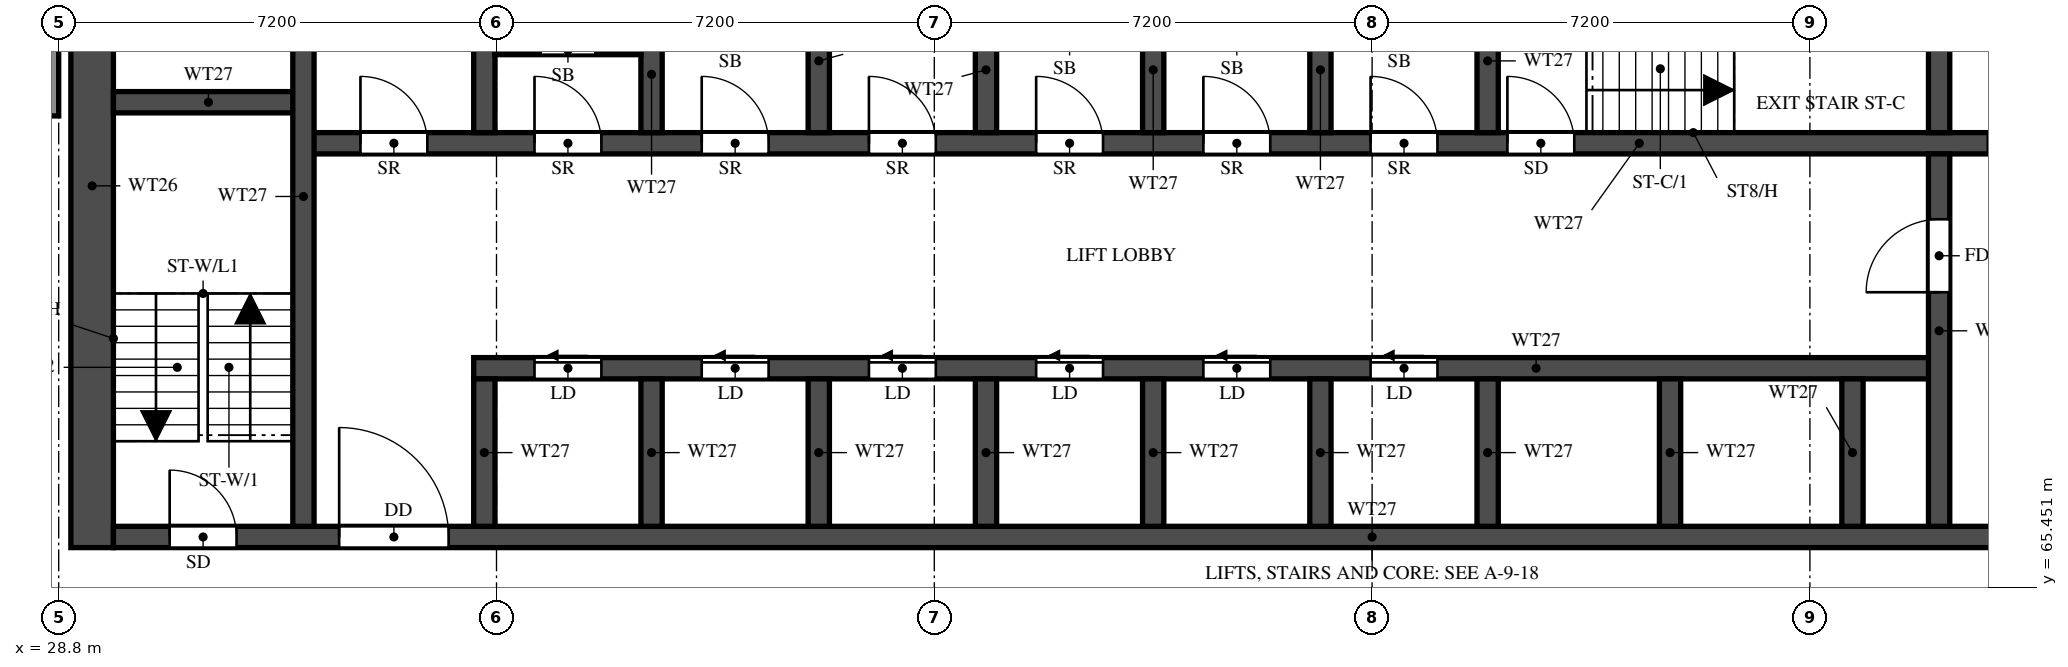
"""IFC4 building model, lengths in metres.
Left out: names, types, materials, properties, quantities, classifications, styles, units other than length and angle.
Written with IfcOpenShell. Run it as: python <this file> out.ifc"""

import sys

from ifc_helpers import new_model, si_unit, direction, frame, frame_2d, origin, place, context, subcontext, project, spatial, rectangle, extrude, element, fill, save


model = new_model("IFC4")
c1 = context("Model", 3, precision=1e-05, world=origin(), true_north=direction((0.0, 1.0)))
c2 = subcontext(c1, "Body", "Model", "MODEL_VIEW")
j1 = project(units=[si_unit("LENGTHUNIT", "METRE"), si_unit("PLANEANGLEUNIT", "RADIAN")], contexts=[c1])
p1 = place(None, origin())
s1 = spatial("IfcSite", under=j1, at=p1, CompositionType="ELEMENT")
p2 = place(p1, origin())
s2 = spatial("IfcBuilding", under=s1, at=p2, CompositionType="ELEMENT")
p3 = place(p2, frame((0.0, 0.0, 127.0)))
s3 = spatial("IfcBuildingStorey", under=s2, at=p3, CompositionType="ELEMENT", Elevation=127.0)
p4 = place(p3, frame((29.35, 66.1, 0.0), z_axis=(0.0, 0.0, 1.0), x_axis=(0.0, 1.0, 0.0)))
e1 = element("IfcWall", 1, at=p4, inside=s3, PredefinedType="SHEAR", context=c2, shape_type="SweptSolid", body=[
    extrude(rectangle(XDim=11.9, YDim=0.7, at=frame_2d((5.95, 0.0))), origin(), (0.0, 0.0, 1.0), 3.2),
])
p5 = place(p3, frame((29.7, 66.275, 0.0), z_axis=(0.0, 0.0, 1.0), x_axis=(1.0, 0.0, 0.0)))
e2 = element("IfcWall", 2, at=p5, inside=s3, PredefinedType="SHEAR", context=c2, shape_type="SweptSolid", body=[
    extrude(rectangle(XDim=41.4, YDim=0.35, at=frame_2d((20.7, 0.0))), origin(), (0.0, 0.0, 1.0), 3.2),
])
p6 = place(p5, frame((0.925, 0.0, 0.0)))
e3 = element("IfcOpeningElement", 3, at=p6, cuts=e2, PredefinedType="OPENING", context=c2, shape_type="SweptSolid", body=[
    extrude(rectangle(XDim=1.1, YDim=2.1, at=frame_2d((0.55, 1.05))), frame((0.0, 0.185, 0.0), z_axis=(0.0, -1.0, 0.0), x_axis=(1.0, 0.0, 0.0)), (0.0, 0.0, 1.0), 0.37),
])
p7 = place(p5, frame((3.712, 0.0, 0.0)))
e4 = element("IfcOpeningElement", 4, at=p7, cuts=e2, PredefinedType="OPENING", context=c2, shape_type="SweptSolid", body=[
    extrude(rectangle(XDim=1.8, YDim=2.1, at=frame_2d((0.9, 1.05))), frame((0.0, 0.185, 0.0), z_axis=(0.0, -1.0, 0.0), x_axis=(1.0, 0.0, 0.0)), (0.0, 0.0, 1.0), 0.37),
])
p8 = place(p3, frame((35.625, 69.05, 0.0), z_axis=(0.0, 0.0, 1.0), x_axis=(1.0, 0.0, 0.0)))
e5 = element("IfcWall", 5, at=p8, inside=s3, PredefinedType="SHEAR", context=c2, shape_type="SweptSolid", body=[
    extrude(rectangle(XDim=24.1, YDim=0.35, at=frame_2d((12.05, 0.0))), origin(), (0.0, 0.0, 1.0), 3.2),
])
p9 = place(p8, frame((1.0, 0.0, 0.0)))
e6 = element("IfcOpeningElement", 6, at=p9, cuts=e5, PredefinedType="OPENING", context=c2, shape_type="SweptSolid", body=[
    extrude(rectangle(XDim=1.1, YDim=2.1, at=frame_2d((0.55, 1.05))), frame((0.0, 0.185, 0.0), z_axis=(0.0, -1.0, 0.0), x_axis=(1.0, 0.0, 0.0)), (0.0, 0.0, 1.0), 0.37),
])
p10 = place(p8, frame((3.75, 0.0, 0.0)))
e7 = element("IfcOpeningElement", 7, at=p10, cuts=e5, PredefinedType="OPENING", context=c2, shape_type="SweptSolid", body=[
    extrude(rectangle(XDim=1.1, YDim=2.1, at=frame_2d((0.55, 1.05))), frame((0.0, 0.185, 0.0), z_axis=(0.0, -1.0, 0.0), x_axis=(1.0, 0.0, 0.0)), (0.0, 0.0, 1.0), 0.37),
])
p11 = place(p8, frame((6.5, 0.0, 0.0)))
e8 = element("IfcOpeningElement", 8, at=p11, cuts=e5, PredefinedType="OPENING", context=c2, shape_type="SweptSolid", body=[
    extrude(rectangle(XDim=1.1, YDim=2.1, at=frame_2d((0.55, 1.05))), frame((0.0, 0.185, 0.0), z_axis=(0.0, -1.0, 0.0), x_axis=(1.0, 0.0, 0.0)), (0.0, 0.0, 1.0), 0.37),
])
p12 = place(p8, frame((9.25, 0.0, 0.0)))
e9 = element("IfcOpeningElement", 9, at=p12, cuts=e5, PredefinedType="OPENING", context=c2, shape_type="SweptSolid", body=[
    extrude(rectangle(XDim=1.1, YDim=2.1, at=frame_2d((0.55, 1.05))), frame((0.0, 0.185, 0.0), z_axis=(0.0, -1.0, 0.0), x_axis=(1.0, 0.0, 0.0)), (0.0, 0.0, 1.0), 0.37),
])
p13 = place(p8, frame((12.0, 0.0, 0.0)))
e10 = element("IfcOpeningElement", 10, at=p13, cuts=e5, PredefinedType="OPENING", context=c2, shape_type="SweptSolid", body=[
    extrude(rectangle(XDim=1.1, YDim=2.1, at=frame_2d((0.55, 1.05))), frame((0.0, 0.185, 0.0), z_axis=(0.0, -1.0, 0.0), x_axis=(1.0, 0.0, 0.0)), (0.0, 0.0, 1.0), 0.37),
])
p14 = place(p8, frame((14.75, 0.0, 0.0)))
e11 = element("IfcOpeningElement", 11, at=p14, cuts=e5, PredefinedType="OPENING", context=c2, shape_type="SweptSolid", body=[
    extrude(rectangle(XDim=1.1, YDim=2.1, at=frame_2d((0.55, 1.05))), frame((0.0, 0.185, 0.0), z_axis=(0.0, -1.0, 0.0), x_axis=(1.0, 0.0, 0.0)), (0.0, 0.0, 1.0), 0.37),
])
p15 = place(p3, frame((32.825, 72.75, 0.0), z_axis=(0.0, 0.0, 1.0), x_axis=(1.0, 0.0, 0.0)))
e12 = element("IfcWall", 12, at=p15, inside=s3, PredefinedType="SHEAR", context=c2, shape_type="SweptSolid", body=[
    extrude(rectangle(XDim=35.15, YDim=0.35, at=frame_2d((17.575, 0.0))), origin(), (0.0, 0.0, 1.0), 3.2),
])
p16 = place(p15, frame((19.8, 0.0, 0.0)))
e13 = element("IfcOpeningElement", 13, at=p16, cuts=e12, PredefinedType="OPENING", context=c2, shape_type="SweptSolid", body=[
    extrude(rectangle(XDim=1.1, YDim=2.1, at=frame_2d((0.55, 1.05))), frame((0.0, 0.185, 0.0), z_axis=(0.0, -1.0, 0.0), x_axis=(1.0, 0.0, 0.0)), (0.0, 0.0, 1.0), 0.37),
])
p17 = place(p15, frame((27.7, 0.0, 0.0)))
e14 = element("IfcOpeningElement", 14, at=p17, cuts=e12, PredefinedType="OPENING", context=c2, shape_type="SweptSolid", body=[
    extrude(rectangle(XDim=1.1, YDim=2.1, at=frame_2d((0.55, 1.05))), frame((0.0, 0.185, 0.0), z_axis=(0.0, -1.0, 0.0), x_axis=(1.0, 0.0, 0.0)), (0.0, 0.0, 1.0), 0.37),
])
p18 = place(p15, frame((30.3, 0.0, 0.0)))
e15 = element("IfcOpeningElement", 15, at=p18, cuts=e12, PredefinedType="OPENING", context=c2, shape_type="SweptSolid", body=[
    extrude(rectangle(XDim=1.1, YDim=2.1, at=frame_2d((0.55, 1.05))), frame((0.0, 0.185, 0.0), z_axis=(0.0, -1.0, 0.0), x_axis=(1.0, 0.0, 0.0)), (0.0, 0.0, 1.0), 0.37),
])
p19 = place(p15, frame((3.8, 0.0, 0.0)))
e16 = element("IfcOpeningElement", 16, at=p19, cuts=e12, PredefinedType="OPENING", context=c2, shape_type="SweptSolid", body=[
    extrude(rectangle(XDim=1.1, YDim=2.1, at=frame_2d((0.55, 1.05))), frame((0.0, 0.185, 0.0), z_axis=(0.0, -1.0, 0.0), x_axis=(1.0, 0.0, 0.0)), (0.0, 0.0, 1.0), 0.37),
])
p20 = place(p15, frame((6.55, 0.0, 0.0)))
e17 = element("IfcOpeningElement", 17, at=p20, cuts=e12, PredefinedType="OPENING", context=c2, shape_type="SweptSolid", body=[
    extrude(rectangle(XDim=1.1, YDim=2.1, at=frame_2d((0.55, 1.05))), frame((0.0, 0.185, 0.0), z_axis=(0.0, -1.0, 0.0), x_axis=(1.0, 0.0, 0.0)), (0.0, 0.0, 1.0), 0.37),
])
p21 = place(p15, frame((9.3, 0.0, 0.0)))
e18 = element("IfcOpeningElement", 18, at=p21, cuts=e12, PredefinedType="OPENING", context=c2, shape_type="SweptSolid", body=[
    extrude(rectangle(XDim=1.1, YDim=2.1, at=frame_2d((0.55, 1.05))), frame((0.0, 0.185, 0.0), z_axis=(0.0, -1.0, 0.0), x_axis=(1.0, 0.0, 0.0)), (0.0, 0.0, 1.0), 0.37),
])
p22 = place(p15, frame((12.05, 0.0, 0.0)))
e19 = element("IfcOpeningElement", 19, at=p22, cuts=e12, PredefinedType="OPENING", context=c2, shape_type="SweptSolid", body=[
    extrude(rectangle(XDim=1.1, YDim=2.1, at=frame_2d((0.55, 1.05))), frame((0.0, 0.185, 0.0), z_axis=(0.0, -1.0, 0.0), x_axis=(1.0, 0.0, 0.0)), (0.0, 0.0, 1.0), 0.37),
])
p23 = place(p15, frame((14.8, 0.0, 0.0)))
e20 = element("IfcOpeningElement", 20, at=p23, cuts=e12, PredefinedType="OPENING", context=c2, shape_type="SweptSolid", body=[
    extrude(rectangle(XDim=1.1, YDim=2.1, at=frame_2d((0.55, 1.05))), frame((0.0, 0.185, 0.0), z_axis=(0.0, -1.0, 0.0), x_axis=(1.0, 0.0, 0.0)), (0.0, 0.0, 1.0), 0.37),
])
p24 = place(p15, frame((17.55, 0.0, 0.0)))
e21 = element("IfcOpeningElement", 21, at=p24, cuts=e12, PredefinedType="OPENING", context=c2, shape_type="SweptSolid", body=[
    extrude(rectangle(XDim=1.1, YDim=2.1, at=frame_2d((0.55, 1.05))), frame((0.0, 0.185, 0.0), z_axis=(0.0, -1.0, 0.0), x_axis=(1.0, 0.0, 0.0)), (0.0, 0.0, 1.0), 0.37),
])
p25 = place(p15, frame((0.938, 0.0, 0.0)))
e22 = element("IfcOpeningElement", 22, at=p25, cuts=e12, PredefinedType="OPENING", context=c2, shape_type="SweptSolid", body=[
    extrude(rectangle(XDim=1.1, YDim=2.1, at=frame_2d((0.55, 1.05))), frame((0.0, 0.185, 0.0), z_axis=(0.0, -1.0, 0.0), x_axis=(1.0, 0.0, 0.0)), (0.0, 0.0, 1.0), 0.37),
])
p26 = place(p3, frame((29.7, 73.425, 0.0), z_axis=(0.0, 0.0, 1.0), x_axis=(1.0, 0.0, 0.0)))
e23 = element("IfcWall", 23, at=p26, inside=s3, PredefinedType="SHEAR", context=c2, shape_type="SweptSolid", body=[
    extrude(rectangle(XDim=3.125, YDim=0.35, at=frame_2d((1.562, 0.0))), origin(), (0.0, 0.0, 1.0), 3.2),
])
p27 = place(p3, frame((32.825, 66.45, 0.0), z_axis=(0.0, 0.0, 1.0), x_axis=(0.0, 1.0, 0.0)))
e24 = element("IfcWall", 24, at=p27, inside=s3, PredefinedType="SHEAR", context=c2, shape_type="SweptSolid", body=[
    extrude(rectangle(XDim=10.85, YDim=0.35, at=frame_2d((5.425, 0.0))), origin(), (0.0, 0.0, 1.0), 3.2),
])
p28 = place(p3, frame((59.725, 66.45, 0.0), z_axis=(0.0, 0.0, 1.0), x_axis=(0.0, 1.0, 0.0)))
e25 = element("IfcWall", 25, at=p28, inside=s3, PredefinedType="SHEAR", context=c2, shape_type="SweptSolid", body=[
    extrude(rectangle(XDim=6.125, YDim=0.35, at=frame_2d((3.062, 0.0))), origin(), (0.0, 0.0, 1.0), 3.2),
])
p29 = place(p28, frame((3.85, 0.0, 0.0)))
e26 = element("IfcOpeningElement", 26, at=p29, cuts=e25, PredefinedType="OPENING", context=c2, shape_type="SweptSolid", body=[
    extrude(rectangle(XDim=1.2, YDim=2.1, at=frame_2d((0.6, 1.05))), frame((0.0, 0.185, 0.0), z_axis=(0.0, -1.0, 0.0), x_axis=(1.0, 0.0, 0.0)), (0.0, 0.0, 1.0), 0.37),
])
p30 = place(p3, frame((59.725, 72.925, 0.0), z_axis=(0.0, 0.0, 1.0), x_axis=(0.0, 1.0, 0.0)))
e27 = element("IfcWall", 27, at=p30, inside=s3, PredefinedType="SHEAR", context=c2, shape_type="SweptSolid", body=[
    extrude(rectangle(XDim=2.95, YDim=0.35, at=frame_2d((1.475, 0.0))), origin(), (0.0, 0.0, 1.0), 3.2),
])
for number, where, z_axis, x_axis in (
    (28, (35.8, 66.45, 0.0), (0.0, 0.0, 1.0), (0.0, 1.0, 0.0)),
    (29, (38.55, 66.45, 0.0), (0.0, 0.0, 1.0), (0.0, 1.0, 0.0)),
    (30, (41.3, 66.45, 0.0), (0.0, 0.0, 1.0), (0.0, 1.0, 0.0)),
    (31, (44.05, 66.45, 0.0), (0.0, 0.0, 1.0), (0.0, 1.0, 0.0)),
    (32, (46.8, 66.45, 0.0), (0.0, 0.0, 1.0), (0.0, 1.0, 0.0)),
    (33, (49.55, 66.45, 0.0), (0.0, 0.0, 1.0), (0.0, 1.0, 0.0)),
    (34, (52.3, 66.45, 0.0), (0.0, 0.0, 1.0), (0.0, 1.0, 0.0)),
    (35, (55.3, 66.45, 0.0), (0.0, 0.0, 1.0), (0.0, 1.0, 0.0)),
    (36, (58.3, 66.45, 0.0), (0.0, 0.0, 1.0), (0.0, 1.0, 0.0)),
):
    element("IfcWall", number, at=place(p3, frame(where, z_axis=z_axis, x_axis=x_axis)), inside=s3, PredefinedType="SHEAR", context=c2, shape_type="SweptSolid", body=[
        extrude(rectangle(XDim=2.425, YDim=0.35, at=frame_2d((1.212, 0.0))), origin(), (0.0, 0.0, 1.0), 3.2),
    ])
for number, where, z_axis, x_axis in (
    (37, (35.8, 72.925, 0.0), (0.0, 0.0, 1.0), (0.0, 1.0, 0.0)),
    (38, (38.55, 72.925, 0.0), (0.0, 0.0, 1.0), (0.0, 1.0, 0.0)),
    (39, (41.3, 72.925, 0.0), (0.0, 0.0, 1.0), (0.0, 1.0, 0.0)),
    (40, (44.05, 72.925, 0.0), (0.0, 0.0, 1.0), (0.0, 1.0, 0.0)),
    (41, (46.8, 72.925, 0.0), (0.0, 0.0, 1.0), (0.0, 1.0, 0.0)),
    (42, (49.55, 72.925, 0.0), (0.0, 0.0, 1.0), (0.0, 1.0, 0.0)),
    (43, (52.3, 72.925, 0.0), (0.0, 0.0, 1.0), (0.0, 1.0, 0.0)),
):
    element("IfcWall", number, at=place(p3, frame(where, z_axis=z_axis, x_axis=x_axis)), inside=s3, PredefinedType="SHEAR", context=c2, shape_type="SweptSolid", body=[
        extrude(rectangle(XDim=2.95, YDim=0.35, at=frame_2d((1.475, 0.0))), origin(), (0.0, 0.0, 1.0), 3.2),
    ])
p31 = place(p3, frame((35.975, 74.282, 0.0), z_axis=(0.0, 0.0, 1.0), x_axis=(1.0, 0.0, 0.0)))
e44 = element("IfcWall", 44, at=p31, inside=s3, PredefinedType="PARTITIONING", context=c2, shape_type="SweptSolid", body=[
    extrude(rectangle(XDim=2.4, YDim=0.15, at=frame_2d((1.2, 0.0))), origin(), (0.0, 0.0, 1.0), 3.2),
])
p32 = place(p31, frame((0.75, 0.0, 0.0)))
e45 = element("IfcOpeningElement", 45, at=p32, cuts=e44, PredefinedType="OPENING", context=c2, shape_type="SweptSolid", body=[
    extrude(rectangle(XDim=0.9, YDim=2.1, at=frame_2d((0.45, 1.05))), frame((0.0, 0.085, 0.0), z_axis=(0.0, -1.0, 0.0), x_axis=(1.0, 0.0, 0.0)), (0.0, 0.0, 1.0), 0.17),
])
p33 = place(p3, frame((28.7, 73.2, 0.0), z_axis=(0.0, 0.0, 1.0), x_axis=(0.0, 1.0, 0.0)))
e46 = element("IfcWall", 46, at=p33, inside=s3, PredefinedType="SOLIDWALL", context=c2, shape_type="SweptSolid", body=[
    extrude(rectangle(XDim=4.8, YDim=0.2, at=frame_2d((2.4, 0.0))), origin(), (0.0, 0.0, 1.0), 3.2),
])
p34 = place(p6, origin())
e47 = element("IfcDoor", 47, at=p34, inside=s3, OperationType="SINGLE_SWING_LEFT", PredefinedType="DOOR", context=c2, shape_type="SweptSolid", body=[
    extrude(rectangle(XDim=1.1, YDim=2.1, at=frame_2d((0.55, 1.05))), frame((0.0, 0.025, 0.0), z_axis=(0.0, -1.0, 0.0), x_axis=(1.0, 0.0, 0.0)), (0.0, 0.0, 1.0), 0.05),
])
fill(e3, e47)
p35 = place(p16, origin())
e48 = element("IfcDoor", 48, at=p35, inside=s3, OperationType="SINGLE_SWING_LEFT", PredefinedType="DOOR", context=c2, shape_type="SweptSolid", body=[
    extrude(rectangle(XDim=1.1, YDim=2.1, at=frame_2d((0.55, 1.05))), frame((0.0, 0.025, 0.0), z_axis=(0.0, -1.0, 0.0), x_axis=(1.0, 0.0, 0.0)), (0.0, 0.0, 1.0), 0.05),
])
fill(e13, e48)
p36 = place(p7, origin())
e49 = element("IfcDoor", 49, at=p36, inside=s3, OperationType="DOUBLE_DOOR_SINGLE_SWING", PredefinedType="DOOR", context=c2, shape_type="SweptSolid", body=[
    extrude(rectangle(XDim=1.8, YDim=2.1, at=frame_2d((0.9, 1.05))), frame((0.0, 0.025, 0.0), z_axis=(0.0, -1.0, 0.0), x_axis=(1.0, 0.0, 0.0)), (0.0, 0.0, 1.0), 0.05),
])
fill(e4, e49)
p37 = place(p29, origin())
e50 = element("IfcDoor", 50, at=p37, inside=s3, OperationType="SINGLE_SWING_LEFT", PredefinedType="DOOR", context=c2, shape_type="SweptSolid", body=[
    extrude(rectangle(XDim=1.2, YDim=2.1, at=frame_2d((0.6, 1.05))), frame((0.0, 0.025, 0.0), z_axis=(0.0, -1.0, 0.0), x_axis=(1.0, 0.0, 0.0)), (0.0, 0.0, 1.0), 0.05),
])
fill(e26, e50)
p38 = place(p17, origin())
e51 = element("IfcDoor", 51, at=p38, inside=s3, OperationType="SLIDING_TO_LEFT", PredefinedType="DOOR", context=c2, shape_type="SweptSolid", body=[
    extrude(rectangle(XDim=1.1, YDim=2.1, at=frame_2d((0.55, 1.05))), frame((0.0, 0.025, 0.0), z_axis=(0.0, -1.0, 0.0), x_axis=(1.0, 0.0, 0.0)), (0.0, 0.0, 1.0), 0.05),
])
fill(e14, e51)
p39 = place(p9, origin())
e52 = element("IfcDoor", 52, at=p39, inside=s3, OperationType="SLIDING_TO_LEFT", PredefinedType="DOOR", context=c2, shape_type="SweptSolid", body=[
    extrude(rectangle(XDim=1.1, YDim=2.1, at=frame_2d((0.55, 1.05))), frame((0.0, 0.025, 0.0), z_axis=(0.0, -1.0, 0.0), x_axis=(1.0, 0.0, 0.0)), (0.0, 0.0, 1.0), 0.05),
])
fill(e6, e52)
p40 = place(p10, origin())
e53 = element("IfcDoor", 53, at=p40, inside=s3, OperationType="SLIDING_TO_LEFT", PredefinedType="DOOR", context=c2, shape_type="SweptSolid", body=[
    extrude(rectangle(XDim=1.1, YDim=2.1, at=frame_2d((0.55, 1.05))), frame((0.0, 0.025, 0.0), z_axis=(0.0, -1.0, 0.0), x_axis=(1.0, 0.0, 0.0)), (0.0, 0.0, 1.0), 0.05),
])
fill(e7, e53)
p41 = place(p11, origin())
e54 = element("IfcDoor", 54, at=p41, inside=s3, OperationType="SLIDING_TO_LEFT", PredefinedType="DOOR", context=c2, shape_type="SweptSolid", body=[
    extrude(rectangle(XDim=1.1, YDim=2.1, at=frame_2d((0.55, 1.05))), frame((0.0, 0.025, 0.0), z_axis=(0.0, -1.0, 0.0), x_axis=(1.0, 0.0, 0.0)), (0.0, 0.0, 1.0), 0.05),
])
fill(e8, e54)
p42 = place(p12, origin())
e55 = element("IfcDoor", 55, at=p42, inside=s3, OperationType="SLIDING_TO_LEFT", PredefinedType="DOOR", context=c2, shape_type="SweptSolid", body=[
    extrude(rectangle(XDim=1.1, YDim=2.1, at=frame_2d((0.55, 1.05))), frame((0.0, 0.025, 0.0), z_axis=(0.0, -1.0, 0.0), x_axis=(1.0, 0.0, 0.0)), (0.0, 0.0, 1.0), 0.05),
])
fill(e9, e55)
p43 = place(p13, origin())
e56 = element("IfcDoor", 56, at=p43, inside=s3, OperationType="SLIDING_TO_LEFT", PredefinedType="DOOR", context=c2, shape_type="SweptSolid", body=[
    extrude(rectangle(XDim=1.1, YDim=2.1, at=frame_2d((0.55, 1.05))), frame((0.0, 0.025, 0.0), z_axis=(0.0, -1.0, 0.0), x_axis=(1.0, 0.0, 0.0)), (0.0, 0.0, 1.0), 0.05),
])
fill(e10, e56)
p44 = place(p14, origin())
e57 = element("IfcDoor", 57, at=p44, inside=s3, OperationType="SLIDING_TO_LEFT", PredefinedType="DOOR", context=c2, shape_type="SweptSolid", body=[
    extrude(rectangle(XDim=1.1, YDim=2.1, at=frame_2d((0.55, 1.05))), frame((0.0, 0.025, 0.0), z_axis=(0.0, -1.0, 0.0), x_axis=(1.0, 0.0, 0.0)), (0.0, 0.0, 1.0), 0.05),
])
fill(e11, e57)
p45 = place(p19, origin())
e58 = element("IfcDoor", 58, at=p45, inside=s3, OperationType="SINGLE_SWING_LEFT", PredefinedType="DOOR", context=c2, shape_type="SweptSolid", body=[
    extrude(rectangle(XDim=1.1, YDim=2.1, at=frame_2d((0.55, 1.05))), frame((0.0, 0.025, 0.0), z_axis=(0.0, -1.0, 0.0), x_axis=(1.0, 0.0, 0.0)), (0.0, 0.0, 1.0), 0.05),
])
fill(e16, e58)
p46 = place(p20, origin())
e59 = element("IfcDoor", 59, at=p46, inside=s3, OperationType="SINGLE_SWING_RIGHT", PredefinedType="DOOR", context=c2, shape_type="SweptSolid", body=[
    extrude(rectangle(XDim=1.1, YDim=2.1, at=frame_2d((0.55, 1.05))), frame((0.0, 0.025, 0.0), z_axis=(0.0, -1.0, 0.0), x_axis=(1.0, 0.0, 0.0)), (0.0, 0.0, 1.0), 0.05),
])
fill(e17, e59)
p47 = place(p21, origin())
e60 = element("IfcDoor", 60, at=p47, inside=s3, OperationType="SINGLE_SWING_LEFT", PredefinedType="DOOR", context=c2, shape_type="SweptSolid", body=[
    extrude(rectangle(XDim=1.1, YDim=2.1, at=frame_2d((0.55, 1.05))), frame((0.0, 0.025, 0.0), z_axis=(0.0, -1.0, 0.0), x_axis=(1.0, 0.0, 0.0)), (0.0, 0.0, 1.0), 0.05),
])
fill(e18, e60)
p48 = place(p22, origin())
e61 = element("IfcDoor", 61, at=p48, inside=s3, OperationType="SINGLE_SWING_RIGHT", PredefinedType="DOOR", context=c2, shape_type="SweptSolid", body=[
    extrude(rectangle(XDim=1.1, YDim=2.1, at=frame_2d((0.55, 1.05))), frame((0.0, 0.025, 0.0), z_axis=(0.0, -1.0, 0.0), x_axis=(1.0, 0.0, 0.0)), (0.0, 0.0, 1.0), 0.05),
])
fill(e19, e61)
p49 = place(p23, origin())
e62 = element("IfcDoor", 62, at=p49, inside=s3, OperationType="SINGLE_SWING_LEFT", PredefinedType="DOOR", context=c2, shape_type="SweptSolid", body=[
    extrude(rectangle(XDim=1.1, YDim=2.1, at=frame_2d((0.55, 1.05))), frame((0.0, 0.025, 0.0), z_axis=(0.0, -1.0, 0.0), x_axis=(1.0, 0.0, 0.0)), (0.0, 0.0, 1.0), 0.05),
])
fill(e20, e62)
p50 = place(p24, origin())
e63 = element("IfcDoor", 63, at=p50, inside=s3, OperationType="SINGLE_SWING_RIGHT", PredefinedType="DOOR", context=c2, shape_type="SweptSolid", body=[
    extrude(rectangle(XDim=1.1, YDim=2.1, at=frame_2d((0.55, 1.05))), frame((0.0, 0.025, 0.0), z_axis=(0.0, -1.0, 0.0), x_axis=(1.0, 0.0, 0.0)), (0.0, 0.0, 1.0), 0.05),
])
fill(e21, e63)
p51 = place(p25, origin())
e64 = element("IfcDoor", 64, at=p51, inside=s3, OperationType="SINGLE_SWING_LEFT", PredefinedType="DOOR", context=c2, shape_type="SweptSolid", body=[
    extrude(rectangle(XDim=1.1, YDim=2.1, at=frame_2d((0.55, 1.05))), frame((0.0, 0.025, 0.0), z_axis=(0.0, -1.0, 0.0), x_axis=(1.0, 0.0, 0.0)), (0.0, 0.0, 1.0), 0.05),
])
fill(e22, e64)
save(model, sys.argv[1])
